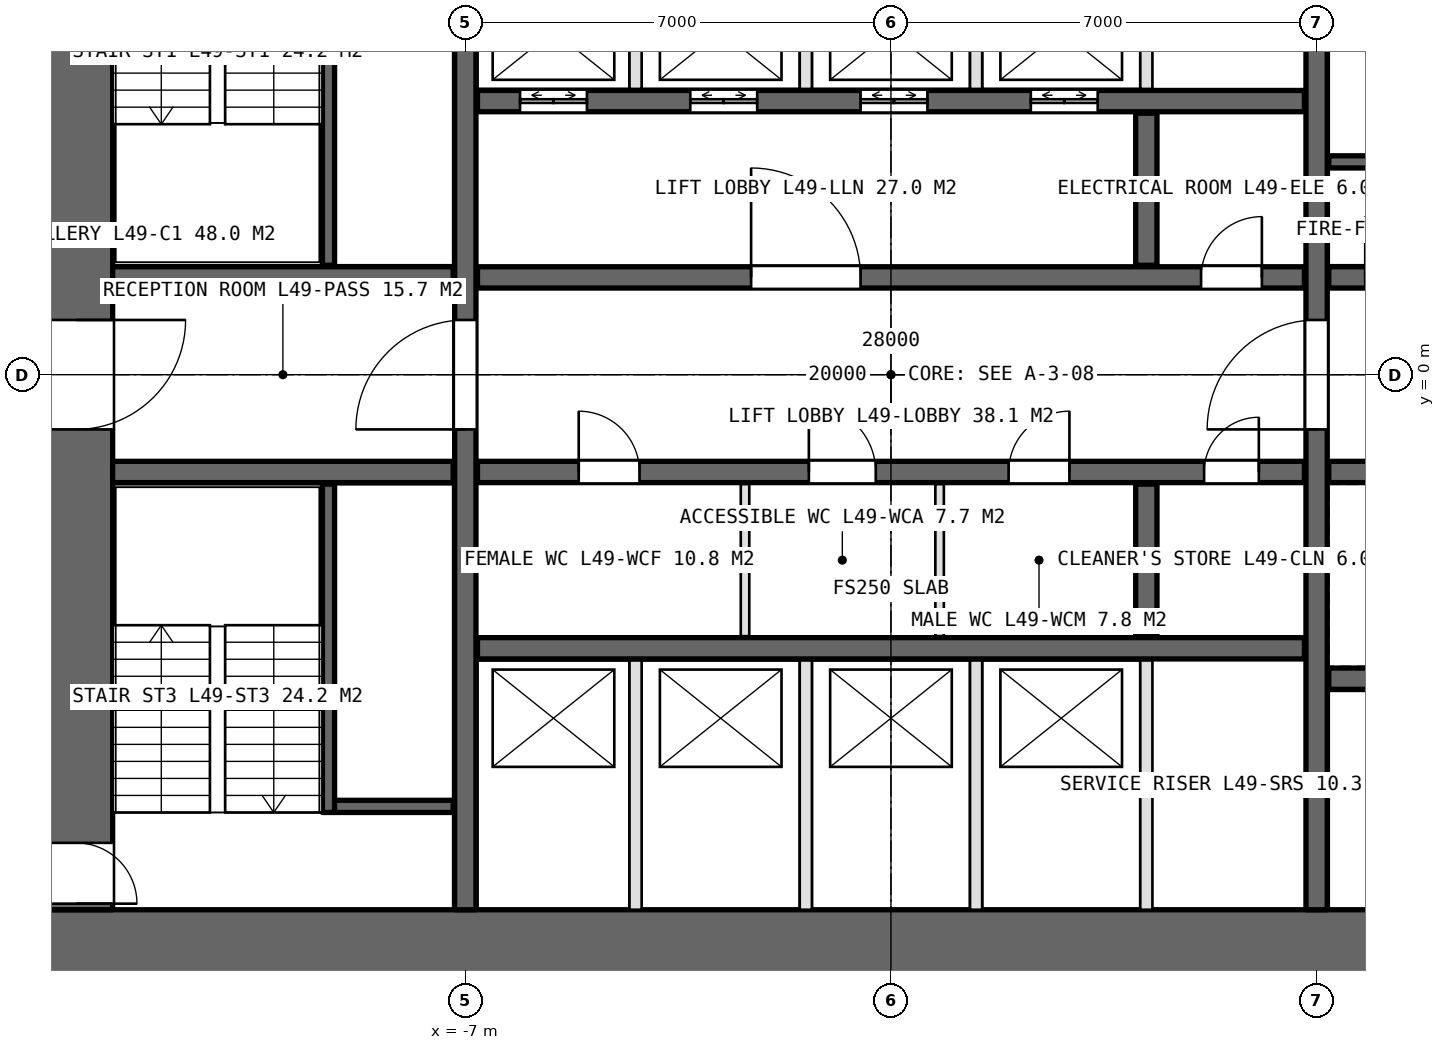
"""IFC4 building model, lengths in metres.
Left out: names, types, materials, properties, quantities, classifications, styles, units other than length and angle.
Written with IfcOpenShell. Run it as: python <this file> out.ifc"""

import sys

from ifc_helpers import new_model, si_unit, direction, frame, frame_2d, origin, place, context, subcontext, project, spatial, rectangle, extrude, element, fill, save


model = new_model("IFC4")
c1 = context("Model", 3, precision=1e-05, world=origin(), true_north=direction((0.0, 1.0)))
c2 = subcontext(c1, "Body", "Model", "MODEL_VIEW")
j1 = project(units=[si_unit("LENGTHUNIT", "METRE"), si_unit("PLANEANGLEUNIT", "RADIAN")], contexts=[c1])
p1 = place(None, origin())
s1 = spatial("IfcSite", under=j1, at=p1, CompositionType="ELEMENT")
p2 = place(p1, origin())
s2 = spatial("IfcBuilding", under=s1, at=p2, CompositionType="ELEMENT")
p3 = place(p2, frame((0.0, 0.0, 224.2)))
s3 = spatial("IfcBuildingStorey", under=s2, at=p3, CompositionType="ELEMENT", Elevation=224.2)
p4 = place(p3, frame((-14.0, -9.4, 0.0), z_axis=(0.0, 0.0, 1.0), x_axis=(1.0, 0.0, 0.0)))
e1 = element("IfcWall", 1, at=p4, inside=s3, PredefinedType="SHEAR", context=c2, shape_type="SweptSolid", body=[
    extrude(rectangle(XDim=28.0, YDim=1.2, at=frame_2d((14.0, 0.0))), origin(), (0.0, 0.0, 1.0), 4.2),
])
p5 = place(p4, frame((22.9, 0.0, 0.0)))
e2 = element("IfcOpeningElement", 2, at=p5, cuts=e1, PredefinedType="OPENING", context=c2, shape_type="SweptSolid", body=[
    extrude(rectangle(XDim=2.2, YDim=2.7, at=frame_2d((1.1, 1.35))), frame((0.0, 0.61, 0.0), z_axis=(0.0, -1.0, 0.0), x_axis=(1.0, 0.0, 0.0)), (0.0, 0.0, 1.0), 1.22),
])
p6 = place(p3, frame((-13.4, 8.8, 0.0), z_axis=(0.0, 0.0, 1.0), x_axis=(0.0, -1.0, 0.0)))
e3 = element("IfcWall", 3, at=p6, inside=s3, PredefinedType="SHEAR", context=c2, shape_type="SweptSolid", body=[
    extrude(rectangle(XDim=17.6, YDim=1.2, at=frame_2d((8.8, 0.0))), origin(), (0.0, 0.0, 1.0), 4.2),
])
p7 = place(p6, frame((7.9, 0.0, 0.0)))
e4 = element("IfcOpeningElement", 4, at=p7, cuts=e3, PredefinedType="OPENING", context=c2, shape_type="SweptSolid", body=[
    extrude(rectangle(XDim=1.8, YDim=2.4, at=frame_2d((0.9, 1.2))), frame((0.0, 0.61, 0.0), z_axis=(0.0, -1.0, 0.0), x_axis=(1.0, 0.0, 0.0)), (0.0, 0.0, 1.0), 1.22),
])
p8 = place(p6, frame((16.5, 0.0, 0.0)))
e5 = element("IfcOpeningElement", 5, at=p8, cuts=e3, PredefinedType="OPENING", context=c2, shape_type="SweptSolid", body=[
    extrude(rectangle(XDim=1.0, YDim=2.4, at=frame_2d((0.5, 1.2))), frame((0.0, 0.61, 0.0), z_axis=(0.0, -1.0, 0.0), x_axis=(1.0, 0.0, 0.0)), (0.0, 0.0, 1.0), 1.22),
])
p9 = place(p3, frame((-7.0, -8.8, 0.0), z_axis=(0.0, 0.0, 1.0), x_axis=(0.0, 1.0, 0.0)))
e6 = element("IfcWall", 6, at=p9, inside=s3, PredefinedType="SHEAR", context=c2, shape_type="SweptSolid", body=[
    extrude(rectangle(XDim=17.6, YDim=0.35, at=frame_2d((8.8, 0.0))), origin(), (0.0, 0.0, 1.0), 4.2),
])
p10 = place(p9, frame((7.9, 0.0, 0.0)))
e7 = element("IfcOpeningElement", 7, at=p10, cuts=e6, PredefinedType="OPENING", context=c2, shape_type="SweptSolid", body=[
    extrude(rectangle(XDim=1.8, YDim=2.4, at=frame_2d((0.9, 1.2))), frame((0.0, 0.185, 0.0), z_axis=(0.0, -1.0, 0.0), x_axis=(1.0, 0.0, 0.0)), (0.0, 0.0, 1.0), 0.37),
])
p11 = place(p3, frame((7.0, -8.8, 0.0), z_axis=(0.0, 0.0, 1.0), x_axis=(0.0, 1.0, 0.0)))
e8 = element("IfcWall", 8, at=p11, inside=s3, PredefinedType="SHEAR", context=c2, shape_type="SweptSolid", body=[
    extrude(rectangle(XDim=17.6, YDim=0.35, at=frame_2d((8.8, 0.0))), origin(), (0.0, 0.0, 1.0), 4.2),
])
p12 = place(p11, frame((7.9, 0.0, 0.0)))
e9 = element("IfcOpeningElement", 9, at=p12, cuts=e8, PredefinedType="OPENING", context=c2, shape_type="SweptSolid", body=[
    extrude(rectangle(XDim=1.8, YDim=2.4, at=frame_2d((0.9, 1.2))), frame((0.0, 0.185, 0.0), z_axis=(0.0, -1.0, 0.0), x_axis=(1.0, 0.0, 0.0)), (0.0, 0.0, 1.0), 0.37),
])
p13 = place(p3, frame((-6.8, 1.6, 0.0), z_axis=(0.0, 0.0, 1.0), x_axis=(1.0, 0.0, 0.0)))
e10 = element("IfcWall", 10, at=p13, inside=s3, PredefinedType="SHEAR", context=c2, shape_type="SweptSolid", body=[
    extrude(rectangle(XDim=13.6, YDim=0.35, at=frame_2d((6.8, 0.0))), origin(), (0.0, 0.0, 1.0), 4.2),
])
p14 = place(p13, frame((11.9, 0.0, 0.0)))
e11 = element("IfcOpeningElement", 11, at=p14, cuts=e10, PredefinedType="OPENING", context=c2, shape_type="SweptSolid", body=[
    extrude(rectangle(XDim=1.0, YDim=2.4, at=frame_2d((0.5, 1.2))), frame((0.0, 0.185, 0.0), z_axis=(0.0, -1.0, 0.0), x_axis=(1.0, 0.0, 0.0)), (0.0, 0.0, 1.0), 0.37),
])
p15 = place(p13, frame((4.5, 0.0, 0.0)))
e12 = element("IfcOpeningElement", 12, at=p15, cuts=e10, PredefinedType="OPENING", context=c2, shape_type="SweptSolid", body=[
    extrude(rectangle(XDim=1.8, YDim=2.4, at=frame_2d((0.9, 1.2))), frame((0.0, 0.185, 0.0), z_axis=(0.0, -1.0, 0.0), x_axis=(1.0, 0.0, 0.0)), (0.0, 0.0, 1.0), 0.37),
])
p16 = place(p3, frame((-6.8, -1.6, 0.0), z_axis=(0.0, 0.0, 1.0), x_axis=(1.0, 0.0, 0.0)))
e13 = element("IfcWall", 13, at=p16, inside=s3, PredefinedType="SHEAR", context=c2, shape_type="SweptSolid", body=[
    extrude(rectangle(XDim=13.6, YDim=0.35, at=frame_2d((6.8, 0.0))), origin(), (0.0, 0.0, 1.0), 4.2),
])
p17 = place(p16, frame((1.665, 0.0, 0.0)))
e14 = element("IfcOpeningElement", 14, at=p17, cuts=e13, PredefinedType="OPENING", context=c2, shape_type="SweptSolid", body=[
    extrude(rectangle(XDim=1.0, YDim=2.4, at=frame_2d((0.5, 1.2))), frame((0.0, 0.185, 0.0), z_axis=(0.0, -1.0, 0.0), x_axis=(1.0, 0.0, 0.0)), (0.0, 0.0, 1.0), 0.37),
])
p18 = place(p16, frame((5.45, 0.0, 0.0)))
e15 = element("IfcOpeningElement", 15, at=p18, cuts=e13, PredefinedType="OPENING", context=c2, shape_type="SweptSolid", body=[
    extrude(rectangle(XDim=1.1, YDim=2.4, at=frame_2d((0.55, 1.2))), frame((0.0, 0.185, 0.0), z_axis=(0.0, -1.0, 0.0), x_axis=(1.0, 0.0, 0.0)), (0.0, 0.0, 1.0), 0.37),
])
p19 = place(p16, frame((8.735, 0.0, 0.0)))
e16 = element("IfcOpeningElement", 16, at=p19, cuts=e13, PredefinedType="OPENING", context=c2, shape_type="SweptSolid", body=[
    extrude(rectangle(XDim=1.0, YDim=2.4, at=frame_2d((0.5, 1.2))), frame((0.0, 0.185, 0.0), z_axis=(0.0, -1.0, 0.0), x_axis=(1.0, 0.0, 0.0)), (0.0, 0.0, 1.0), 0.37),
])
p20 = place(p16, frame((11.95, 0.0, 0.0)))
e17 = element("IfcOpeningElement", 17, at=p20, cuts=e13, PredefinedType="OPENING", context=c2, shape_type="SweptSolid", body=[
    extrude(rectangle(XDim=0.9, YDim=2.4, at=frame_2d((0.45, 1.2))), frame((0.0, 0.185, 0.0), z_axis=(0.0, -1.0, 0.0), x_axis=(1.0, 0.0, 0.0)), (0.0, 0.0, 1.0), 0.37),
])
p21 = place(p3, frame((-6.8, 4.5, 0.0), z_axis=(0.0, 0.0, 1.0), x_axis=(1.0, 0.0, 0.0)))
e18 = element("IfcWall", 18, at=p21, inside=s3, PredefinedType="SHEAR", context=c2, shape_type="SweptSolid", body=[
    extrude(rectangle(XDim=13.6, YDim=0.35, at=frame_2d((6.8, 0.0))), origin(), (0.0, 0.0, 1.0), 4.2),
])
p22 = place(p21, frame((0.7, 0.0, 0.0)))
e19 = element("IfcOpeningElement", 19, at=p22, cuts=e18, PredefinedType="OPENING", context=c2, shape_type="SweptSolid", body=[
    extrude(rectangle(XDim=1.1, YDim=2.4, at=frame_2d((0.55, 1.2))), frame((0.0, 0.185, 0.0), z_axis=(0.0, -1.0, 0.0), x_axis=(1.0, 0.0, 0.0)), (0.0, 0.0, 1.0), 0.37),
])
p23 = place(p21, frame((3.5, 0.0, 0.0)))
e20 = element("IfcOpeningElement", 20, at=p23, cuts=e18, PredefinedType="OPENING", context=c2, shape_type="SweptSolid", body=[
    extrude(rectangle(XDim=1.1, YDim=2.4, at=frame_2d((0.55, 1.2))), frame((0.0, 0.185, 0.0), z_axis=(0.0, -1.0, 0.0), x_axis=(1.0, 0.0, 0.0)), (0.0, 0.0, 1.0), 0.37),
])
p24 = place(p21, frame((6.3, 0.0, 0.0)))
e21 = element("IfcOpeningElement", 21, at=p24, cuts=e18, PredefinedType="OPENING", context=c2, shape_type="SweptSolid", body=[
    extrude(rectangle(XDim=1.1, YDim=2.4, at=frame_2d((0.55, 1.2))), frame((0.0, 0.185, 0.0), z_axis=(0.0, -1.0, 0.0), x_axis=(1.0, 0.0, 0.0)), (0.0, 0.0, 1.0), 0.37),
])
p25 = place(p21, frame((9.1, 0.0, 0.0)))
e22 = element("IfcOpeningElement", 22, at=p25, cuts=e18, PredefinedType="OPENING", context=c2, shape_type="SweptSolid", body=[
    extrude(rectangle(XDim=1.1, YDim=2.4, at=frame_2d((0.55, 1.2))), frame((0.0, 0.185, 0.0), z_axis=(0.0, -1.0, 0.0), x_axis=(1.0, 0.0, 0.0)), (0.0, 0.0, 1.0), 0.37),
])
p26 = place(p3, frame((-6.8, -4.5, 0.0), z_axis=(0.0, 0.0, 1.0), x_axis=(1.0, 0.0, 0.0)))
e23 = element("IfcWall", 23, at=p26, inside=s3, PredefinedType="SHEAR", context=c2, shape_type="SweptSolid", body=[
    extrude(rectangle(XDim=13.6, YDim=0.35, at=frame_2d((6.8, 0.0))), origin(), (0.0, 0.0, 1.0), 4.2),
])
for number, where, z_axis, x_axis in (
    (24, (-12.8, 1.6, 0.0), (0.0, 0.0, 1.0), (1.0, 0.0, 0.0)),
    (25, (-12.8, -1.6, 0.0), (0.0, 0.0, 1.0), (1.0, 0.0, 0.0)),
):
    element("IfcWall", number, at=place(p3, frame(where, z_axis=z_axis, x_axis=x_axis)), inside=s3, PredefinedType="SHEAR", context=c2, shape_type="SweptSolid", body=[
        extrude(rectangle(XDim=5.6, YDim=0.35, at=frame_2d((2.8, 0.0))), origin(), (0.0, 0.0, 1.0), 4.2),
    ])
p27 = place(p3, frame((7.2, 1.6, 0.0), z_axis=(0.0, 0.0, 1.0), x_axis=(1.0, 0.0, 0.0)))
e26 = element("IfcWall", 26, at=p27, inside=s3, PredefinedType="SHEAR", context=c2, shape_type="SweptSolid", body=[
    extrude(rectangle(XDim=5.6, YDim=0.35, at=frame_2d((2.8, 0.0))), origin(), (0.0, 0.0, 1.0), 4.2),
])
p28 = place(p27, frame((0.6, 0.0, 0.0)))
e27 = element("IfcOpeningElement", 27, at=p28, cuts=e26, PredefinedType="OPENING", context=c2, shape_type="SweptSolid", body=[
    extrude(rectangle(XDim=1.0, YDim=2.4, at=frame_2d((0.5, 1.2))), frame((0.0, 0.185, 0.0), z_axis=(0.0, -1.0, 0.0), x_axis=(1.0, 0.0, 0.0)), (0.0, 0.0, 1.0), 0.37),
])
p29 = place(p3, frame((7.2, -1.6, 0.0), z_axis=(0.0, 0.0, 1.0), x_axis=(1.0, 0.0, 0.0)))
e28 = element("IfcWall", 28, at=p29, inside=s3, PredefinedType="SHEAR", context=c2, shape_type="SweptSolid", body=[
    extrude(rectangle(XDim=5.6, YDim=0.35, at=frame_2d((2.8, 0.0))), origin(), (0.0, 0.0, 1.0), 4.2),
])
p30 = place(p29, frame((0.9, 0.0, 0.0)))
e29 = element("IfcOpeningElement", 29, at=p30, cuts=e28, PredefinedType="OPENING", context=c2, shape_type="SweptSolid", body=[
    extrude(rectangle(XDim=1.3, YDim=2.4, at=frame_2d((0.65, 1.2))), frame((0.0, 0.185, 0.0), z_axis=(0.0, -1.0, 0.0), x_axis=(1.0, 0.0, 0.0)), (0.0, 0.0, 1.0), 0.37),
])
p31 = place(p29, frame((3.9, 0.0, 0.0)))
e30 = element("IfcOpeningElement", 30, at=p31, cuts=e28, PredefinedType="OPENING", context=c2, shape_type="SweptSolid", body=[
    extrude(rectangle(XDim=1.3, YDim=2.4, at=frame_2d((0.65, 1.2))), frame((0.0, 0.185, 0.0), z_axis=(0.0, -1.0, 0.0), x_axis=(1.0, 0.0, 0.0)), (0.0, 0.0, 1.0), 0.37),
])
p32 = place(p3, frame((7.2, -5.0, 0.0), z_axis=(0.0, 0.0, 1.0), x_axis=(1.0, 0.0, 0.0)))
e31 = element("IfcWall", 31, at=p32, inside=s3, PredefinedType="SHEAR", context=c2, shape_type="SweptSolid", body=[
    extrude(rectangle(XDim=5.6, YDim=0.35, at=frame_2d((2.8, 0.0))), origin(), (0.0, 0.0, 1.0), 4.2),
])
for number, where, z_axis, x_axis in (
    (32, (4.2, 1.8, 0.0), (0.0, 0.0, 1.0), (0.0, 1.0, 0.0)),
    (33, (4.2, -4.3, 0.0), (0.0, 0.0, 1.0), (0.0, 1.0, 0.0)),
):
    element("IfcWall", number, at=place(p3, frame(where, z_axis=z_axis, x_axis=x_axis)), inside=s3, PredefinedType="SHEAR", context=c2, shape_type="SweptSolid", body=[
        extrude(rectangle(XDim=2.5, YDim=0.35, at=frame_2d((1.25, 0.0))), origin(), (0.0, 0.0, 1.0), 4.2),
    ])
for number, where, z_axis, x_axis in (
    (34, (-2.4, -1.8, 0.0), (0.0, 0.0, 1.0), (0.0, -1.0, 0.0)),
    (35, (0.8, -1.8, 0.0), (0.0, 0.0, 1.0), (0.0, -1.0, 0.0)),
):
    element("IfcWall", number, at=place(p3, frame(where, z_axis=z_axis, x_axis=x_axis)), inside=s3, PredefinedType="PARTITIONING", context=c2, shape_type="SweptSolid", body=[
        extrude(rectangle(XDim=2.5, YDim=0.14, at=frame_2d((1.25, 0.0))), origin(), (0.0, 0.0, 1.0), 3.95),
    ])
for number, where, z_axis, x_axis in (
    (36, (-4.2, 4.7, 0.0), (0.0, 0.0, 1.0), (0.0, 1.0, 0.0)),
    (37, (-1.4, 4.7, 0.0), (0.0, 0.0, 1.0), (0.0, 1.0, 0.0)),
    (38, (1.4, 4.7, 0.0), (0.0, 0.0, 1.0), (0.0, 1.0, 0.0)),
    (39, (4.2, 4.7, 0.0), (0.0, 0.0, 1.0), (0.0, 1.0, 0.0)),
    (40, (-4.2, -4.7, 0.0), (0.0, 0.0, 1.0), (0.0, -1.0, 0.0)),
    (41, (-1.4, -4.7, 0.0), (0.0, 0.0, 1.0), (0.0, -1.0, 0.0)),
    (42, (1.4, -4.7, 0.0), (0.0, 0.0, 1.0), (0.0, -1.0, 0.0)),
    (43, (4.2, -4.7, 0.0), (0.0, 0.0, 1.0), (0.0, -1.0, 0.0)),
):
    element("IfcWall", number, at=place(p3, frame(where, z_axis=z_axis, x_axis=x_axis)), inside=s3, PredefinedType="PARTITIONING", context=c2, shape_type="SweptSolid", body=[
        extrude(rectangle(XDim=4.1, YDim=0.2, at=frame_2d((2.05, 0.0))), origin(), (0.0, 0.0, 1.0), 4.2),
    ])
for number, where, z_axis, x_axis in (
    (44, (-9.25, 7.2, 0.0), (0.0, 0.0, 1.0), (0.0, -1.0, 0.0)),
    (45, (-9.25, -7.2, 0.0), (0.0, 0.0, 1.0), (0.0, 1.0, 0.0)),
):
    element("IfcWall", number, at=place(p3, frame(where, z_axis=z_axis, x_axis=x_axis)), inside=s3, PredefinedType="SOLIDWALL", context=c2, shape_type="SweptSolid", body=[
        extrude(rectangle(XDim=5.4, YDim=0.2, at=frame_2d((2.7, 0.0))), origin(), (0.0, 0.0, 1.0), 4.2),
    ])
for number, where, z_axis, x_axis in (
    (46, (-9.15, -7.1, 0.0), (0.0, 0.0, 1.0), (1.0, 0.0, 0.0)),
    (47, (9.15, 3.5, 0.0), (0.0, 0.0, 1.0), (-1.0, 0.0, 0.0)),
):
    element("IfcWall", number, at=place(p3, frame(where, z_axis=z_axis, x_axis=x_axis)), inside=s3, PredefinedType="SOLIDWALL", context=c2, shape_type="SweptSolid", body=[
        extrude(rectangle(XDim=1.95, YDim=0.2, at=frame_2d((0.975, 0.0))), origin(), (0.0, 0.0, 1.0), 4.2),
    ])
p33 = place(p7, origin())
e48 = element("IfcDoor", 48, at=p33, inside=s3, OperationType="DOUBLE_DOOR_SINGLE_SWING", PredefinedType="DOOR", context=c2, shape_type="SweptSolid", body=[
    extrude(rectangle(XDim=1.8, YDim=2.4, at=frame_2d((0.9, 1.2))), frame((0.0, 0.025, 0.0), z_axis=(0.0, -1.0, 0.0), x_axis=(1.0, 0.0, 0.0)), (0.0, 0.0, 1.0), 0.05),
])
fill(e4, e48)
p34 = place(p10, origin())
e49 = element("IfcDoor", 49, at=p34, inside=s3, OperationType="DOUBLE_DOOR_SINGLE_SWING", PredefinedType="DOOR", context=c2, shape_type="SweptSolid", body=[
    extrude(rectangle(XDim=1.8, YDim=2.4, at=frame_2d((0.9, 1.2))), frame((0.0, 0.025, 0.0), z_axis=(0.0, -1.0, 0.0), x_axis=(1.0, 0.0, 0.0)), (0.0, 0.0, 1.0), 0.05),
])
fill(e7, e49)
p35 = place(p12, origin())
e50 = element("IfcDoor", 50, at=p35, inside=s3, OperationType="DOUBLE_DOOR_SINGLE_SWING", PredefinedType="DOOR", context=c2, shape_type="SweptSolid", body=[
    extrude(rectangle(XDim=1.8, YDim=2.4, at=frame_2d((0.9, 1.2))), frame((0.0, 0.025, 0.0), z_axis=(0.0, -1.0, 0.0), x_axis=(1.0, 0.0, 0.0)), (0.0, 0.0, 1.0), 0.05),
])
fill(e9, e50)
p36 = place(p8, origin())
e51 = element("IfcDoor", 51, at=p36, inside=s3, OperationType="SINGLE_SWING_RIGHT", PredefinedType="DOOR", context=c2, shape_type="SweptSolid", body=[
    extrude(rectangle(XDim=1.0, YDim=2.4, at=frame_2d((0.5, 1.2))), frame((0.0, 0.025, 0.0), z_axis=(0.0, -1.0, 0.0), x_axis=(1.0, 0.0, 0.0)), (0.0, 0.0, 1.0), 0.05),
])
fill(e5, e51)
p37 = place(p17, origin())
e52 = element("IfcDoor", 52, at=p37, inside=s3, OperationType="SINGLE_SWING_LEFT", PredefinedType="DOOR", context=c2, shape_type="SweptSolid", body=[
    extrude(rectangle(XDim=1.0, YDim=2.4, at=frame_2d((0.5, 1.2))), frame((0.0, 0.025, 0.0), z_axis=(0.0, -1.0, 0.0), x_axis=(1.0, 0.0, 0.0)), (0.0, 0.0, 1.0), 0.05),
])
fill(e14, e52)
p38 = place(p18, origin())
e53 = element("IfcDoor", 53, at=p38, inside=s3, OperationType="SINGLE_SWING_LEFT", PredefinedType="DOOR", context=c2, shape_type="SweptSolid", body=[
    extrude(rectangle(XDim=1.1, YDim=2.4, at=frame_2d((0.55, 1.2))), frame((0.0, 0.025, 0.0), z_axis=(0.0, -1.0, 0.0), x_axis=(1.0, 0.0, 0.0)), (0.0, 0.0, 1.0), 0.05),
])
fill(e15, e53)
p39 = place(p19, origin())
e54 = element("IfcDoor", 54, at=p39, inside=s3, OperationType="SINGLE_SWING_RIGHT", PredefinedType="DOOR", context=c2, shape_type="SweptSolid", body=[
    extrude(rectangle(XDim=1.0, YDim=2.4, at=frame_2d((0.5, 1.2))), frame((0.0, 0.025, 0.0), z_axis=(0.0, -1.0, 0.0), x_axis=(1.0, 0.0, 0.0)), (0.0, 0.0, 1.0), 0.05),
])
fill(e16, e54)
p40 = place(p14, origin())
e55 = element("IfcDoor", 55, at=p40, inside=s3, OperationType="SINGLE_SWING_RIGHT", PredefinedType="DOOR", context=c2, shape_type="SweptSolid", body=[
    extrude(rectangle(XDim=1.0, YDim=2.4, at=frame_2d((0.5, 1.2))), frame((0.0, 0.025, 0.0), z_axis=(0.0, -1.0, 0.0), x_axis=(1.0, 0.0, 0.0)), (0.0, 0.0, 1.0), 0.05),
])
fill(e11, e55)
p41 = place(p20, origin())
e56 = element("IfcDoor", 56, at=p41, inside=s3, OperationType="SINGLE_SWING_RIGHT", PredefinedType="DOOR", context=c2, shape_type="SweptSolid", body=[
    extrude(rectangle(XDim=0.9, YDim=2.4, at=frame_2d((0.45, 1.2))), frame((0.0, 0.025, 0.0), z_axis=(0.0, -1.0, 0.0), x_axis=(1.0, 0.0, 0.0)), (0.0, 0.0, 1.0), 0.05),
])
fill(e17, e56)
p42 = place(p15, origin())
e57 = element("IfcDoor", 57, at=p42, inside=s3, OperationType="DOUBLE_DOOR_SINGLE_SWING", PredefinedType="DOOR", context=c2, shape_type="SweptSolid", body=[
    extrude(rectangle(XDim=1.8, YDim=2.4, at=frame_2d((0.9, 1.2))), frame((0.0, 0.025, 0.0), z_axis=(0.0, -1.0, 0.0), x_axis=(1.0, 0.0, 0.0)), (0.0, 0.0, 1.0), 0.05),
])
fill(e12, e57)
p43 = place(p22, origin())
e58 = element("IfcDoor", 58, at=p43, inside=s3, OperationType="DOUBLE_DOOR_SLIDING", PredefinedType="DOOR", context=c2, shape_type="SweptSolid", body=[
    extrude(rectangle(XDim=1.1, YDim=2.4, at=frame_2d((0.55, 1.2))), frame((0.0, 0.025, 0.0), z_axis=(0.0, -1.0, 0.0), x_axis=(1.0, 0.0, 0.0)), (0.0, 0.0, 1.0), 0.05),
])
fill(e19, e58)
p44 = place(p23, origin())
e59 = element("IfcDoor", 59, at=p44, inside=s3, OperationType="DOUBLE_DOOR_SLIDING", PredefinedType="DOOR", context=c2, shape_type="SweptSolid", body=[
    extrude(rectangle(XDim=1.1, YDim=2.4, at=frame_2d((0.55, 1.2))), frame((0.0, 0.025, 0.0), z_axis=(0.0, -1.0, 0.0), x_axis=(1.0, 0.0, 0.0)), (0.0, 0.0, 1.0), 0.05),
])
fill(e20, e59)
p45 = place(p24, origin())
e60 = element("IfcDoor", 60, at=p45, inside=s3, OperationType="DOUBLE_DOOR_SLIDING", PredefinedType="DOOR", context=c2, shape_type="SweptSolid", body=[
    extrude(rectangle(XDim=1.1, YDim=2.4, at=frame_2d((0.55, 1.2))), frame((0.0, 0.025, 0.0), z_axis=(0.0, -1.0, 0.0), x_axis=(1.0, 0.0, 0.0)), (0.0, 0.0, 1.0), 0.05),
])
fill(e21, e60)
p46 = place(p25, origin())
e61 = element("IfcDoor", 61, at=p46, inside=s3, OperationType="DOUBLE_DOOR_SLIDING", PredefinedType="DOOR", context=c2, shape_type="SweptSolid", body=[
    extrude(rectangle(XDim=1.1, YDim=2.4, at=frame_2d((0.55, 1.2))), frame((0.0, 0.025, 0.0), z_axis=(0.0, -1.0, 0.0), x_axis=(1.0, 0.0, 0.0)), (0.0, 0.0, 1.0), 0.05),
])
fill(e22, e61)
save(model, sys.argv[1])
